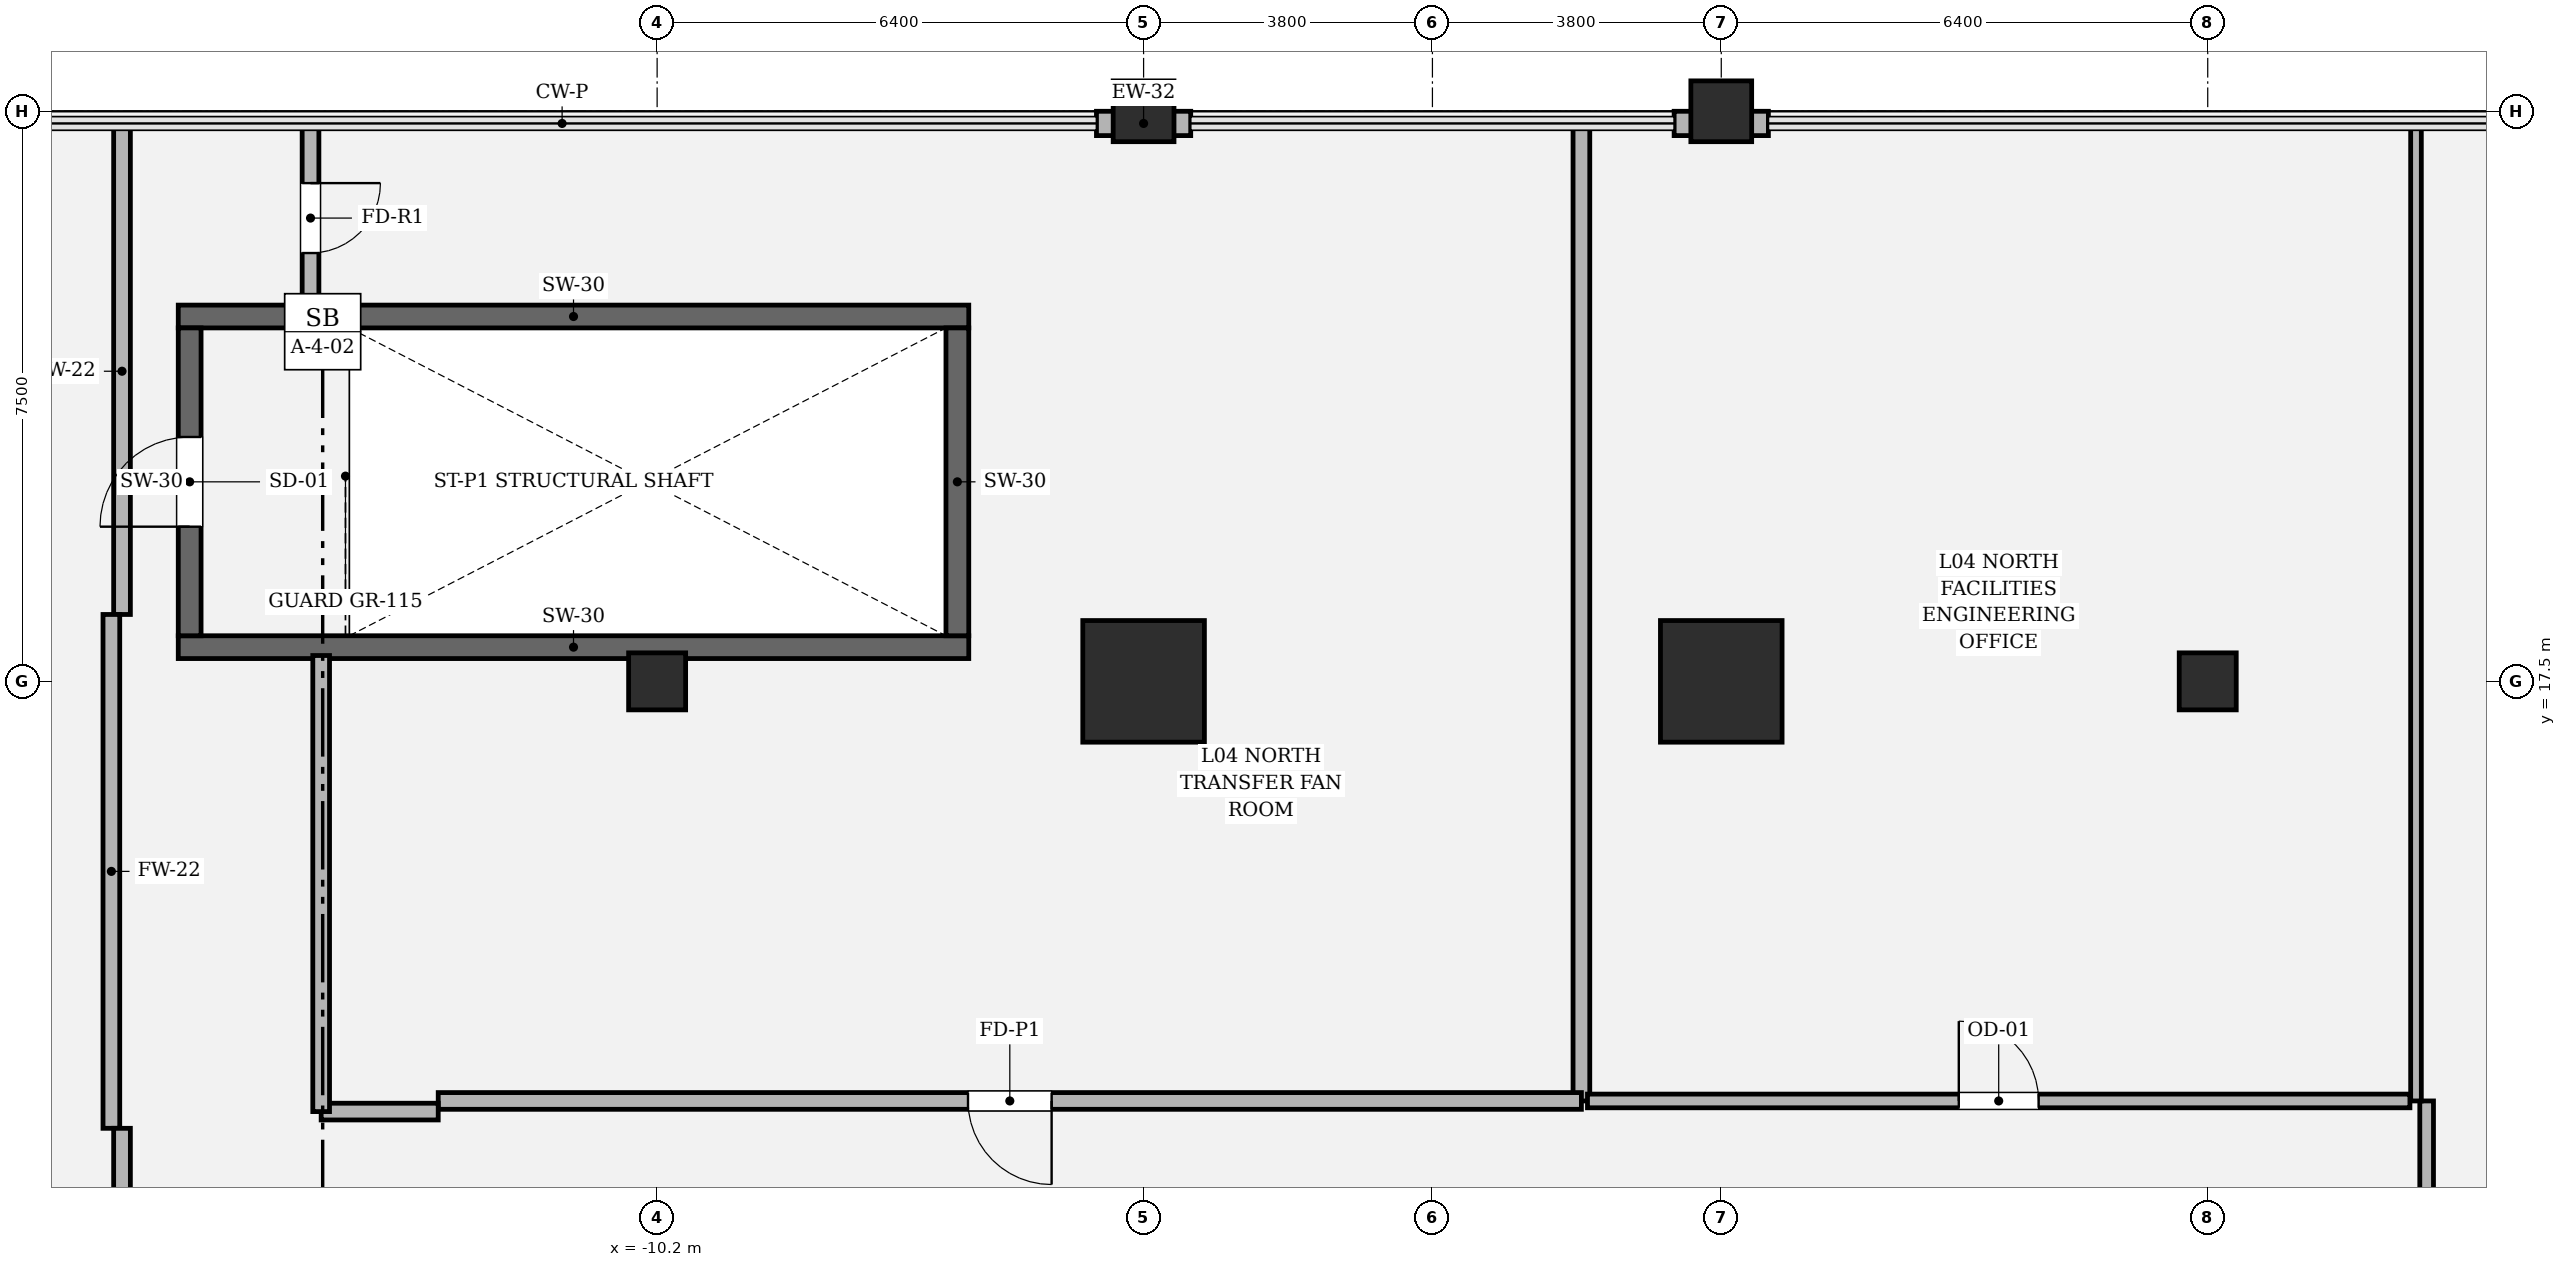
"""IFC4 building model, lengths in metres.
Left out: names, types, materials, properties, quantities, classifications, styles, units other than length and angle.
Written with IfcOpenShell. Run it as: python <this file> out.ifc"""

import sys

from ifc_helpers import new_model, si_unit, direction, frame, frame_2d, origin, origin_2d, place, context, subcontext, project, spatial, rectangle, hollow_rectangle, circle, extrude, element, fill, save


model = new_model("IFC4")
c1 = context("Model", 3, precision=1e-05, world=origin(), true_north=direction((0.0, 1.0)))
c2 = subcontext(c1, "Body", "Model", "MODEL_VIEW")
j1 = project(units=[si_unit("LENGTHUNIT", "METRE"), si_unit("PLANEANGLEUNIT", "RADIAN")], contexts=[c1])
p1 = place(None, origin())
s1 = spatial("IfcSite", under=j1, at=p1, CompositionType="ELEMENT")
p2 = place(p1, origin())
s2 = spatial("IfcBuilding", under=s1, at=p2, CompositionType="ELEMENT")
p3 = place(p2, frame((0.0, 0.0, 22.2)))
s3 = spatial("IfcBuildingStorey", under=s2, at=p3, CompositionType="ELEMENT", Elevation=22.2)
for number, where, z_axis, x_axis in (
    (1, (-16.5, 17.95, 0.0), (0.0, 0.0, 1.0), (1.0, 0.0, 0.0)),
    (2, (-6.1, 22.3, 0.0), (0.0, 0.0, 1.0), (-1.0, 0.0, 0.0)),
):
    element("IfcWall", number, at=place(p3, frame(where, z_axis=z_axis, x_axis=x_axis)), inside=s3, PredefinedType="SOLIDWALL", context=c2, shape_type="SweptSolid", body=[
        extrude(rectangle(XDim=10.4, YDim=0.3, at=frame_2d((5.2, 0.0))), origin(), (0.0, 0.0, 1.0), 6.0),
    ])
p4 = place(p3, frame((-16.35, 18.1, 0.0), z_axis=(0.0, 0.0, 1.0), x_axis=(0.0, 1.0, 0.0)))
e3 = element("IfcWall", 3, at=p4, inside=s3, PredefinedType="SOLIDWALL", context=c2, shape_type="SweptSolid", body=[
    extrude(rectangle(XDim=4.05, YDim=0.3, at=frame_2d((2.025, 0.0))), origin(), (0.0, 0.0, 1.0), 6.0),
])
p5 = place(p4, frame((1.435, 0.0, 0.0)))
e4 = element("IfcOpeningElement", 4, at=p5, cuts=e3, PredefinedType="OPENING", context=c2, shape_type="SweptSolid", body=[
    extrude(rectangle(XDim=1.18, YDim=2.2, at=frame_2d((0.59, 1.1))), frame((0.0, 0.16, 0.0), z_axis=(0.0, -1.0, 0.0), x_axis=(1.0, 0.0, 0.0)), (0.0, 0.0, 1.0), 0.32),
])
p6 = place(p3, frame((-6.25, 22.15, 0.0), z_axis=(0.0, 0.0, 1.0), x_axis=(0.0, -1.0, 0.0)))
e5 = element("IfcWall", 5, at=p6, inside=s3, PredefinedType="SOLIDWALL", context=c2, shape_type="SweptSolid", body=[
    extrude(rectangle(XDim=4.05, YDim=0.3, at=frame_2d((2.025, 0.0))), origin(), (0.0, 0.0, 1.0), 6.0),
])
for number, where, z_axis, x_axis in (
    (6, (3.8, 17.5, 0.0), (0.0, 0.0, 1.0), (1.0, 0.0, 0.0)),
    (7, (-3.8, 17.5, 0.0), (0.0, 0.0, 1.0), (1.0, 0.0, 0.0)),
):
    element("IfcColumn", number, at=place(p3, frame(where, z_axis=z_axis, x_axis=x_axis)), inside=s3, PredefinedType="COLUMN", context=c2, shape_type="SweptSolid", body=[
        extrude(hollow_rectangle(XDim=1.6, YDim=1.6, WallThickness=0.05, at=origin_2d()), origin(), (0.0, 0.0, 1.0), 6.0),
    ])
for number, where, z_axis, x_axis in (
    (8, (-3.8, 25.0, 0.0), (0.0, 0.0, 1.0), (1.0, 0.0, 0.0)),
    (9, (3.8, 25.0, 0.0), (0.0, 0.0, 1.0), (1.0, 0.0, 0.0)),
):
    element("IfcColumn", number, at=place(p3, frame(where, z_axis=z_axis, x_axis=x_axis)), inside=s3, PredefinedType="COLUMN", context=c2, shape_type="SweptSolid", body=[
        extrude(rectangle(XDim=0.8, YDim=0.8, at=origin_2d()), origin(), (0.0, 0.0, 1.0), 6.0),
    ])
for number, where, z_axis, x_axis in (
    (10, (-10.2, 17.5, 0.0), (0.0, 0.0, 1.0), (1.0, 0.0, 0.0)),
    (11, (10.2, 17.5, 0.0), (0.0, 0.0, 1.0), (1.0, 0.0, 0.0)),
):
    element("IfcColumn", number, at=place(p3, frame(where, z_axis=z_axis, x_axis=x_axis)), inside=s3, PredefinedType="PILASTER", context=c2, shape_type="SweptSolid", body=[
        extrude(circle(Radius=0.375, at=origin_2d()), origin(), (0.0, 0.0, 1.0), 6.0),
    ])
for number, where, z_axis, x_axis in (
    (12, (-3.18, 24.84, 0.0), (0.0, 0.0, 1.0), (-1.0, 0.0, 0.0)),
    (13, (4.42, 24.84, 0.0), (0.0, 0.0, 1.0), (-1.0, 0.0, 0.0)),
):
    element("IfcWall", number, at=place(p3, frame(where, z_axis=z_axis, x_axis=x_axis)), inside=s3, PredefinedType="SOLIDWALL", context=c2, shape_type="SweptSolid", body=[
        extrude(rectangle(XDim=1.24, YDim=0.32, at=frame_2d((0.62, 0.0))), origin(), (0.0, 0.0, 1.0), 4.394),
    ])
p7 = place(p3, frame((-17.24, 24.78, 0.0), z_axis=(0.0, 0.0, 1.0), x_axis=(0.0, -1.0, 0.0)))
e14 = element("IfcWall", 14, at=p7, inside=s3, PredefinedType="SOLIDWALL", context=c2, shape_type="SweptSolid", body=[
    extrude(rectangle(XDim=6.4, YDim=0.22, at=frame_2d((3.2, 0.0))), origin(), (0.0, 0.0, 1.0), 5.72),
])
p8 = place(p3, frame((-17.38, 18.38, 0.0), z_axis=(0.0, 0.0, 1.0), x_axis=(0.0, -1.0, 0.0)))
e15 = element("IfcWall", 15, at=p8, inside=s3, PredefinedType="SOLIDWALL", context=c2, shape_type="SweptSolid", body=[
    extrude(rectangle(XDim=6.76, YDim=0.22, at=frame_2d((3.38, 0.0))), origin(), (0.0, 0.0, 1.0), 4.394),
])
p9 = place(p3, frame((-17.24, 11.62, 0.0), z_axis=(0.0, 0.0, 1.0), x_axis=(0.0, -1.0, 0.0)))
e16 = element("IfcWall", 16, at=p9, inside=s3, PredefinedType="SOLIDWALL", context=c2, shape_type="SweptSolid", body=[
    extrude(rectangle(XDim=10.24, YDim=0.22, at=frame_2d((5.12, 0.0))), origin(), (0.0, 0.0, 1.0), 4.394),
])
p10 = place(p3, frame((1.96, 24.78, 0.0), z_axis=(0.0, 0.0, 1.0), x_axis=(0.0, -1.0, 0.0)))
e17 = element("IfcWall", 17, at=p10, inside=s3, PredefinedType="SOLIDWALL", context=c2, shape_type="SweptSolid", body=[
    extrude(rectangle(XDim=12.8, YDim=0.22, at=frame_2d((6.4, 0.0))), origin(), (0.0, 0.0, 1.0), 4.394),
])
p11 = place(p3, frame((1.96, 11.98, 0.0), z_axis=(0.0, 0.0, 1.0), x_axis=(-1.0, 0.0, 0.0)))
e18 = element("IfcWall", 18, at=p11, inside=s3, PredefinedType="SOLIDWALL", context=c2, shape_type="SweptSolid", body=[
    extrude(rectangle(XDim=15.04, YDim=0.22, at=frame_2d((7.52, 0.0))), origin(), (0.0, 0.0, 1.0), 4.394),
])
p12 = place(p11, frame((6.97, 0.0, 0.0)))
e19 = element("IfcOpeningElement", 19, at=p12, cuts=e18, PredefinedType="OPENING", context=c2, shape_type="SweptSolid", body=[
    extrude(rectangle(XDim=1.1, YDim=2.2, at=frame_2d((0.55, 1.1))), frame((0.0, 0.12, 0.0), z_axis=(0.0, -1.0, 0.0), x_axis=(1.0, 0.0, 0.0)), (0.0, 0.0, 1.0), 0.24),
])
p13 = place(p3, frame((-13.08, 11.84, 0.0), z_axis=(0.0, 0.0, 1.0), x_axis=(-1.0, 0.0, 0.0)))
e20 = element("IfcWall", 20, at=p13, inside=s3, PredefinedType="SOLIDWALL", context=c2, shape_type="SweptSolid", body=[
    extrude(rectangle(XDim=1.54, YDim=0.22, at=frame_2d((0.77, 0.0))), origin(), (0.0, 0.0, 1.0), 5.264),
])
p14 = place(p3, frame((-14.62, 11.84, 0.0), z_axis=(0.0, 0.0, 1.0), x_axis=(0.0, 1.0, 0.0)))
e21 = element("IfcWall", 21, at=p14, inside=s3, PredefinedType="SOLIDWALL", context=c2, shape_type="SweptSolid", body=[
    extrude(rectangle(XDim=6.0, YDim=0.22, at=frame_2d((3.0, 0.0))), origin(), (0.0, 0.0, 1.0), 4.394),
])
p15 = place(p3, frame((-14.76, 22.41, 0.0), z_axis=(0.0, 0.0, 1.0), x_axis=(0.0, 1.0, 0.0)))
e22 = element("IfcWall", 22, at=p15, inside=s3, PredefinedType="SOLIDWALL", context=c2, shape_type="SweptSolid", body=[
    extrude(rectangle(XDim=2.37, YDim=0.22, at=frame_2d((1.185, 0.0))), origin(), (0.0, 0.0, 1.0), 5.72),
])
p16 = place(p15, frame((0.725, 0.0, 0.0)))
e23 = element("IfcOpeningElement", 23, at=p16, cuts=e22, PredefinedType="OPENING", context=c2, shape_type="SweptSolid", body=[
    extrude(rectangle(XDim=0.92, YDim=2.1, at=frame_2d((0.46, 1.05))), frame((0.0, 0.12, 0.0), z_axis=(0.0, -1.0, 0.0), x_axis=(1.0, 0.0, 0.0)), (0.0, 0.0, 1.0), 0.24),
])
p17 = place(p3, frame((13.08, 1.38, 0.0), z_axis=(0.0, 0.0, 1.0), x_axis=(0.0, 1.0, 0.0)))
e24 = element("IfcWall", 24, at=p17, inside=s3, PredefinedType="PARTITIONING", context=c2, shape_type="SweptSolid", body=[
    extrude(rectangle(XDim=10.6, YDim=0.18, at=frame_2d((5.3, 0.0))), origin(), (0.0, 0.0, 1.0), 4.394),
])
p18 = place(p3, frame((12.94, 11.98, 0.0), z_axis=(0.0, 0.0, 1.0), x_axis=(0.0, 1.0, 0.0)))
e25 = element("IfcWall", 25, at=p18, inside=s3, PredefinedType="PARTITIONING", context=c2, shape_type="SweptSolid", body=[
    extrude(rectangle(XDim=12.8, YDim=0.14, at=frame_2d((6.4, 0.0))), origin(), (0.0, 0.0, 1.0), 4.394),
])
p19 = place(p3, frame((12.86, 11.98, 0.0), z_axis=(0.0, 0.0, 1.0), x_axis=(-1.0, 0.0, 0.0)))
e26 = element("IfcWall", 26, at=p19, inside=s3, PredefinedType="PARTITIONING", context=c2, shape_type="SweptSolid", body=[
    extrude(rectangle(XDim=10.82, YDim=0.18, at=frame_2d((5.41, 0.0))), origin(), (0.0, 0.0, 1.0), 4.394),
])
p20 = place(p19, frame((4.885, 0.0, 0.0)))
e27 = element("IfcOpeningElement", 27, at=p20, cuts=e26, PredefinedType="OPENING", context=c2, shape_type="SweptSolid", body=[
    extrude(rectangle(XDim=1.05, YDim=2.2, at=frame_2d((0.525, 1.1))), frame((0.0, 0.1, 0.0), z_axis=(0.0, -1.0, 0.0), x_axis=(1.0, 0.0, 0.0)), (0.0, 0.0, 1.0), 0.2),
])
p21 = place(p5, origin())
e28 = element("IfcDoor", 28, at=p21, inside=s3, OperationType="SINGLE_SWING_LEFT", PredefinedType="DOOR", context=c2, shape_type="SweptSolid", body=[
    extrude(rectangle(XDim=1.18, YDim=2.2, at=frame_2d((0.59, 1.1))), frame((0.0, 0.025, 0.0), z_axis=(0.0, -1.0, 0.0), x_axis=(1.0, 0.0, 0.0)), (0.0, 0.0, 1.0), 0.05),
])
fill(e4, e28)
p22 = place(p12, origin())
e29 = element("IfcDoor", 29, at=p22, inside=s3, OperationType="SINGLE_SWING_LEFT", PredefinedType="DOOR", context=c2, shape_type="SweptSolid", body=[
    extrude(rectangle(XDim=1.1, YDim=2.2, at=frame_2d((0.55, 1.1))), frame((0.0, 0.025, 0.0), z_axis=(0.0, -1.0, 0.0), x_axis=(1.0, 0.0, 0.0)), (0.0, 0.0, 1.0), 0.05),
])
fill(e19, e29)
p23 = place(p16, origin())
e30 = element("IfcDoor", 30, at=p23, inside=s3, OperationType="SINGLE_SWING_RIGHT", PredefinedType="DOOR", context=c2, shape_type="SweptSolid", body=[
    extrude(rectangle(XDim=0.92, YDim=2.1, at=frame_2d((0.46, 1.05))), frame((0.0, 0.025, 0.0), z_axis=(0.0, -1.0, 0.0), x_axis=(1.0, 0.0, 0.0)), (0.0, 0.0, 1.0), 0.05),
])
fill(e23, e30)
p24 = place(p20, origin())
e31 = element("IfcDoor", 31, at=p24, inside=s3, OperationType="SINGLE_SWING_RIGHT", PredefinedType="DOOR", context=c2, shape_type="SweptSolid", body=[
    extrude(rectangle(XDim=1.05, YDim=2.2, at=frame_2d((0.525, 1.1))), frame((0.0, 0.025, 0.0), z_axis=(0.0, -1.0, 0.0), x_axis=(1.0, 0.0, 0.0)), (0.0, 0.0, 1.0), 0.05),
])
fill(e27, e31)
save(model, sys.argv[1])
